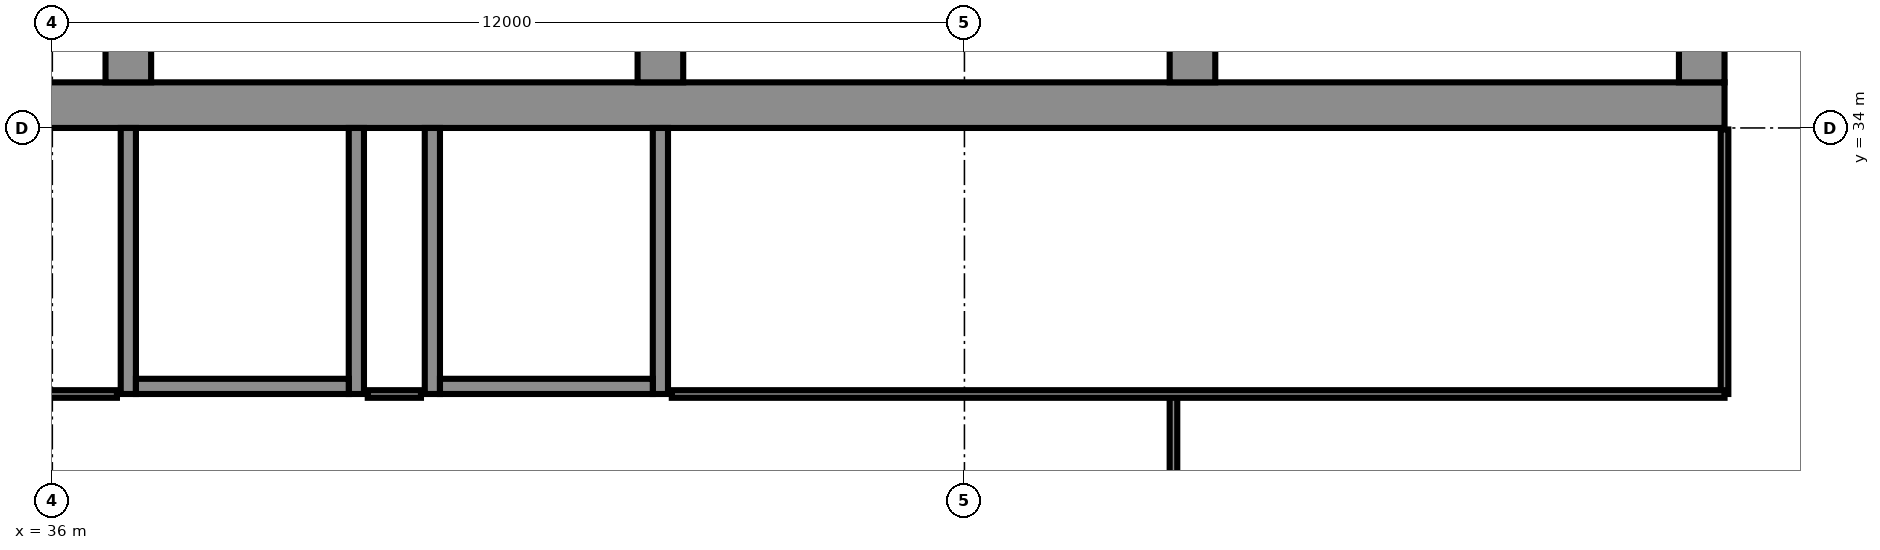
"""IFC4 building model, lengths in metres.
Left out: names, types, materials, properties, quantities, classifications, styles, units other than length and angle.
Written with IfcOpenShell. Run it as: python <this file> out.ifc"""

import sys

from ifc_helpers import new_model, si_unit, direction, frame, frame_2d, origin, place, context, subcontext, project, spatial, polyline, rectangle, outline, extrude, element, fill, save


model = new_model("IFC4")
c1 = context("Model", 3, precision=1e-05, world=origin(), true_north=direction((0.0, 1.0)))
c2 = subcontext(c1, "Body", "Model", "MODEL_VIEW")
j1 = project(units=[si_unit("LENGTHUNIT", "METRE"), si_unit("PLANEANGLEUNIT", "RADIAN")], contexts=[c1])
p1 = place(None, origin())
s1 = spatial("IfcSite", under=j1, at=p1, CompositionType="ELEMENT")
p2 = place(p1, origin())
s2 = spatial("IfcBuilding", under=s1, at=p2, CompositionType="ELEMENT")
p3 = place(p2, frame((0.0, 0.0, 207.1)))
s3 = spatial("IfcBuildingStorey", under=s2, at=p3, CompositionType="ELEMENT", Elevation=207.1)
p4 = place(p3, frame((23.0, 34.3, 0.0), z_axis=(0.0, 0.0, 1.0), x_axis=(1.0, 0.0, 0.0)))
e1 = element("IfcWall", 1, at=p4, inside=s3, PredefinedType="SHEAR", context=c2, shape_type="SweptSolid", body=[
    extrude(rectangle(XDim=35.0, YDim=0.6, at=frame_2d((17.5, 0.0))), origin(), (0.0, 0.0, 1.0), 3.6),
])
p5 = place(p4, frame((0.65, 0.0, 0.0)))
e2 = element("IfcOpeningElement", 2, at=p5, cuts=e1, PredefinedType="OPENING", context=c2, shape_type="SweptSolid", body=[
    extrude(rectangle(XDim=1.2, YDim=2.1, at=frame_2d((0.6, 1.05))), frame((0.0, 0.31, 0.0), z_axis=(0.0, -1.0, 0.0), x_axis=(1.0, 0.0, 0.0)), (0.0, 0.0, 1.0), 0.62),
])
p6 = place(p4, frame((7.717, 0.0, 0.0)))
e3 = element("IfcOpeningElement", 3, at=p6, cuts=e1, PredefinedType="OPENING", context=c2, shape_type="SweptSolid", body=[
    extrude(rectangle(XDim=1.1, YDim=2.1, at=frame_2d((0.55, 1.05))), frame((0.0, 0.31, 0.0), z_axis=(0.0, -1.0, 0.0), x_axis=(1.0, 0.0, 0.0)), (0.0, 0.0, 1.0), 0.62),
])
p7 = place(p4, frame((12.183, 0.0, 0.0)))
e4 = element("IfcOpeningElement", 4, at=p7, cuts=e1, PredefinedType="OPENING", context=c2, shape_type="SweptSolid", body=[
    extrude(rectangle(XDim=1.1, YDim=2.1, at=frame_2d((0.55, 1.05))), frame((0.0, 0.31, 0.0), z_axis=(0.0, -1.0, 0.0), x_axis=(1.0, 0.0, 0.0)), (0.0, 0.0, 1.0), 0.62),
])
p8 = place(p4, frame((9.8, 0.0, 0.0)))
e5 = element("IfcOpeningElement", 5, at=p8, cuts=e1, PredefinedType="OPENING", context=c2, shape_type="SweptSolid", body=[
    extrude(rectangle(XDim=1.4, YDim=2.1, at=frame_2d((0.7, 1.05))), frame((0.0, 0.31, 0.0), z_axis=(0.0, -1.0, 0.0), x_axis=(1.0, 0.0, 0.0)), (0.0, 0.0, 1.0), 0.62),
])
p9 = place(p4, frame((14.717, 0.0, 0.0)))
e6 = element("IfcOpeningElement", 6, at=p9, cuts=e1, PredefinedType="OPENING", context=c2, shape_type="SweptSolid", body=[
    extrude(rectangle(XDim=1.1, YDim=2.1, at=frame_2d((0.55, 1.05))), frame((0.0, 0.31, 0.0), z_axis=(0.0, -1.0, 0.0), x_axis=(1.0, 0.0, 0.0)), (0.0, 0.0, 1.0), 0.62),
])
p10 = place(p4, frame((16.95, 0.0, 0.0)))
e7 = element("IfcOpeningElement", 7, at=p10, cuts=e1, PredefinedType="OPENING", context=c2, shape_type="SweptSolid", body=[
    extrude(rectangle(XDim=1.1, YDim=2.1, at=frame_2d((0.55, 1.05))), frame((0.0, 0.31, 0.0), z_axis=(0.0, -1.0, 0.0), x_axis=(1.0, 0.0, 0.0)), (0.0, 0.0, 1.0), 0.62),
])
p11 = place(p4, frame((19.183, 0.0, 0.0)))
e8 = element("IfcOpeningElement", 8, at=p11, cuts=e1, PredefinedType="OPENING", context=c2, shape_type="SweptSolid", body=[
    extrude(rectangle(XDim=1.1, YDim=2.1, at=frame_2d((0.55, 1.05))), frame((0.0, 0.31, 0.0), z_axis=(0.0, -1.0, 0.0), x_axis=(1.0, 0.0, 0.0)), (0.0, 0.0, 1.0), 0.62),
])
p12 = place(p4, frame((26.15, 0.0, 0.0)))
e9 = element("IfcOpeningElement", 9, at=p12, cuts=e1, PredefinedType="OPENING", context=c2, shape_type="SweptSolid", body=[
    extrude(rectangle(XDim=1.2, YDim=2.1, at=frame_2d((0.6, 1.05))), frame((0.0, 0.31, 0.0), z_axis=(0.0, -1.0, 0.0), x_axis=(1.0, 0.0, 0.0)), (0.0, 0.0, 1.0), 0.62),
])
p13 = place(p4, frame((28.767, 0.0, 0.0)))
e10 = element("IfcOpeningElement", 10, at=p13, cuts=e1, PredefinedType="OPENING", context=c2, shape_type="SweptSolid", body=[
    extrude(rectangle(XDim=1.0, YDim=2.1, at=frame_2d((0.5, 1.05))), frame((0.0, 0.31, 0.0), z_axis=(0.0, -1.0, 0.0), x_axis=(1.0, 0.0, 0.0)), (0.0, 0.0, 1.0), 0.62),
])
p14 = place(p4, frame((33.083, 0.0, 0.0)))
e11 = element("IfcOpeningElement", 11, at=p14, cuts=e1, PredefinedType="OPENING", context=c2, shape_type="SweptSolid", body=[
    extrude(rectangle(XDim=1.0, YDim=2.1, at=frame_2d((0.5, 1.05))), frame((0.0, 0.31, 0.0), z_axis=(0.0, -1.0, 0.0), x_axis=(1.0, 0.0, 0.0)), (0.0, 0.0, 1.0), 0.62),
])
p15 = place(p4, frame((30.8, 0.0, 0.0)))
e12 = element("IfcOpeningElement", 12, at=p15, cuts=e1, PredefinedType="OPENING", context=c2, shape_type="SweptSolid", body=[
    extrude(rectangle(XDim=1.4, YDim=2.1, at=frame_2d((0.7, 1.05))), frame((0.0, 0.31, 0.0), z_axis=(0.0, -1.0, 0.0), x_axis=(1.0, 0.0, 0.0)), (0.0, 0.0, 1.0), 0.62),
])
p16 = place(p3, frame((37.0, 34.6, 0.0), z_axis=(0.0, 0.0, 1.0), x_axis=(0.0, 1.0, 0.0)))
e13 = element("IfcWall", 13, at=p16, inside=s3, PredefinedType="SHEAR", context=c2, shape_type="SweptSolid", body=[
    extrude(rectangle(XDim=14.784, YDim=0.6, at=frame_2d((7.392, 0.0))), origin(), (0.0, 0.0, 1.0), 3.6),
])
p17 = place(p16, frame((11.302, 0.0, 0.0)))
e14 = element("IfcOpeningElement", 14, at=p17, cuts=e13, PredefinedType="OPENING", context=c2, shape_type="SweptSolid", body=[
    extrude(rectangle(XDim=1.0, YDim=2.1, at=frame_2d((0.5, 1.05))), frame((0.0, 0.31, 0.0), z_axis=(0.0, -1.0, 0.0), x_axis=(1.0, 0.0, 0.0)), (0.0, 0.0, 1.0), 0.62),
])
p18 = place(p16, frame((3.8, 0.0, 0.0)))
e15 = element("IfcOpeningElement", 15, at=p18, cuts=e13, PredefinedType="OPENING", context=c2, shape_type="SweptSolid", body=[
    extrude(rectangle(XDim=1.1, YDim=2.1, at=frame_2d((0.55, 1.05))), frame((0.0, 0.31, 0.0), z_axis=(0.0, -1.0, 0.0), x_axis=(1.0, 0.0, 0.0)), (0.0, 0.0, 1.0), 0.62),
])
p19 = place(p3, frame((44.0, 34.6, 0.0), z_axis=(0.0, 0.0, 1.0), x_axis=(0.0, 1.0, 0.0)))
e16 = element("IfcWall", 16, at=p19, inside=s3, PredefinedType="SHEAR", context=c2, shape_type="SweptSolid", body=[
    extrude(rectangle(XDim=14.784, YDim=0.6, at=frame_2d((7.392, 0.0))), origin(), (0.0, 0.0, 1.0), 3.6),
])
p20 = place(p19, frame((11.608, 0.0, 0.0)))
e17 = element("IfcOpeningElement", 17, at=p20, cuts=e16, PredefinedType="OPENING", context=c2, shape_type="SweptSolid", body=[
    extrude(rectangle(XDim=1.0, YDim=2.1, at=frame_2d((0.5, 1.05))), frame((0.0, 0.31, 0.0), z_axis=(0.0, -1.0, 0.0), x_axis=(1.0, 0.0, 0.0)), (0.0, 0.0, 1.0), 0.62),
])
p21 = place(p19, frame((3.8, 0.0, 0.0)))
e18 = element("IfcOpeningElement", 18, at=p21, cuts=e16, PredefinedType="OPENING", context=c2, shape_type="SweptSolid", body=[
    extrude(rectangle(XDim=1.1, YDim=2.1, at=frame_2d((0.55, 1.05))), frame((0.0, 0.31, 0.0), z_axis=(0.0, -1.0, 0.0), x_axis=(1.0, 0.0, 0.0)), (0.0, 0.0, 1.0), 0.62),
])
p22 = place(p3, frame((51.0, 34.6, 0.0), z_axis=(0.0, 0.0, 1.0), x_axis=(0.0, 1.0, 0.0)))
e19 = element("IfcWall", 19, at=p22, inside=s3, PredefinedType="SHEAR", context=c2, shape_type="SweptSolid", body=[
    extrude(rectangle(XDim=14.171, YDim=0.6, at=frame_2d((7.085, 0.0))), origin(), (0.0, 0.0, 1.0), 3.6),
])
p23 = place(p22, frame((3.8, 0.0, 0.0)))
e20 = element("IfcOpeningElement", 20, at=p23, cuts=e19, PredefinedType="OPENING", context=c2, shape_type="SweptSolid", body=[
    extrude(rectangle(XDim=1.1, YDim=2.1, at=frame_2d((0.55, 1.05))), frame((0.0, 0.31, 0.0), z_axis=(0.0, -1.0, 0.0), x_axis=(1.0, 0.0, 0.0)), (0.0, 0.0, 1.0), 0.62),
])
p24 = place(p3, frame((57.7, 34.6, 0.0), z_axis=(0.0, 0.0, 1.0), x_axis=(0.0, 1.0, 0.0)))
e21 = element("IfcWall", 21, at=p24, inside=s3, PredefinedType="SHEAR", context=c2, shape_type="SweptSolid", body=[
    extrude(rectangle(XDim=13.585, YDim=0.6, at=frame_2d((6.792, 0.0))), origin(), (0.0, 0.0, 1.0), 3.6),
])
p25 = place(p3, frame((0.0, 0.0, -0.0)))
e22 = element("IfcWall", 22, at=p25, inside=s3, PredefinedType="PARTITIONING", context=c2, shape_type="SweptSolid", body=[
    extrude(outline(polyline([(34.567, 37.65), (34.767, 37.65), (36.7, 37.65), (36.7, 37.45), (34.767, 37.45), (34.767, 34.6), (34.567, 34.6), (34.567, 37.65)])), origin(), (0.0, 0.0, 1.0), 3.2),
])
p26 = place(p3, frame((0.0, 0.0, -0.0)))
e23 = element("IfcWall", 23, at=p26, inside=s3, PredefinedType="PARTITIONING", context=c2, shape_type="SweptSolid", body=[
    extrude(outline(polyline([(41.567, 37.1), (39.433, 37.1), (39.433, 34.6), (39.233, 34.6), (39.233, 37.45), (37.3, 37.45), (37.3, 37.65), (39.233, 37.65), (39.433, 37.65), (39.433, 37.3), (41.567, 37.3), (41.567, 37.35), (41.767, 37.35), (43.7, 37.35), (43.7, 37.15), (41.767, 37.15), (41.767, 34.6), (41.567, 34.6), (41.567, 37.1)])), origin(), (0.0, 0.0, 1.0), 3.2),
])
p27 = place(p3, frame((0.0, 0.0, -0.0)))
e24 = element("IfcWall", 24, at=p27, inside=s3, PredefinedType="PARTITIONING", context=c2, shape_type="SweptSolid", body=[
    extrude(outline(polyline([(53.233, 34.6), (53.233, 37.3), (53.433, 37.3), (53.433, 34.6), (53.233, 34.6)])), origin(), (0.0, 0.0, 1.0), 3.2),
])
p28 = place(p3, frame((0.0, 0.0, -0.0)))
e25 = element("IfcWall", 25, at=p28, inside=s3, PredefinedType="PARTITIONING", context=c2, shape_type="SweptSolid", body=[
    extrude(outline(polyline([(55.567, 34.6), (55.567, 37.3), (55.767, 37.3), (55.767, 34.6), (55.567, 34.6)])), origin(), (0.0, 0.0, 1.0), 3.2),
])
p29 = place(p3, frame((37.0, 30.5, 0.0), z_axis=(0.0, 0.0, 1.0), x_axis=(0.0, 1.0, 0.0)))
e26 = element("IfcWall", 26, at=p29, inside=s3, PredefinedType="PARTITIONING", context=c2, shape_type="SweptSolid", body=[
    extrude(rectangle(XDim=3.5, YDim=0.2, at=frame_2d((1.75, 0.0))), origin(), (0.0, 0.0, 1.0), 3.2),
])
p30 = place(p29, frame((1.2, 0.0, 0.0)))
e27 = element("IfcOpeningElement", 27, at=p30, cuts=e26, PredefinedType="OPENING", context=c2, shape_type="SweptSolid", body=[
    extrude(rectangle(XDim=1.1, YDim=2.1, at=frame_2d((0.55, 1.05))), frame((0.0, 0.11, 0.0), z_axis=(0.0, -1.0, 0.0), x_axis=(1.0, 0.0, 0.0)), (0.0, 0.0, 1.0), 0.22),
])
p31 = place(p3, frame((40.0, 30.5, 0.0), z_axis=(0.0, 0.0, 1.0), x_axis=(0.0, 1.0, 0.0)))
e28 = element("IfcWall", 28, at=p31, inside=s3, PredefinedType="PARTITIONING", context=c2, shape_type="SweptSolid", body=[
    extrude(rectangle(XDim=3.5, YDim=0.2, at=frame_2d((1.75, 0.0))), origin(), (0.0, 0.0, 1.0), 3.2),
])
p32 = place(p3, frame((37.1, 30.6, 0.0), z_axis=(0.0, 0.0, 1.0), x_axis=(1.0, 0.0, 0.0)))
e29 = element("IfcWall", 29, at=p32, inside=s3, PredefinedType="PARTITIONING", context=c2, shape_type="SweptSolid", body=[
    extrude(rectangle(XDim=2.8, YDim=0.2, at=frame_2d((1.4, 0.0))), origin(), (0.0, 0.0, 1.0), 3.2),
])
p33 = place(p3, frame((41.0, 30.5, 0.0), z_axis=(0.0, 0.0, 1.0), x_axis=(0.0, 1.0, 0.0)))
e30 = element("IfcWall", 30, at=p33, inside=s3, PredefinedType="PARTITIONING", context=c2, shape_type="SweptSolid", body=[
    extrude(rectangle(XDim=3.5, YDim=0.2, at=frame_2d((1.75, 0.0))), origin(), (0.0, 0.0, 1.0), 3.2),
])
p34 = place(p3, frame((44.0, 30.5, 0.0), z_axis=(0.0, 0.0, 1.0), x_axis=(0.0, 1.0, 0.0)))
e31 = element("IfcWall", 31, at=p34, inside=s3, PredefinedType="PARTITIONING", context=c2, shape_type="SweptSolid", body=[
    extrude(rectangle(XDim=3.5, YDim=0.2, at=frame_2d((1.75, 0.0))), origin(), (0.0, 0.0, 1.0), 3.2),
])
p35 = place(p34, frame((1.2, 0.0, 0.0)))
e32 = element("IfcOpeningElement", 32, at=p35, cuts=e31, PredefinedType="OPENING", context=c2, shape_type="SweptSolid", body=[
    extrude(rectangle(XDim=1.1, YDim=2.1, at=frame_2d((0.55, 1.05))), frame((0.0, 0.11, 0.0), z_axis=(0.0, -1.0, 0.0), x_axis=(1.0, 0.0, 0.0)), (0.0, 0.0, 1.0), 0.22),
])
p36 = place(p3, frame((41.1, 30.6, 0.0), z_axis=(0.0, 0.0, 1.0), x_axis=(1.0, 0.0, 0.0)))
e33 = element("IfcWall", 33, at=p36, inside=s3, PredefinedType="PARTITIONING", context=c2, shape_type="SweptSolid", body=[
    extrude(rectangle(XDim=2.8, YDim=0.2, at=frame_2d((1.4, 0.0))), origin(), (0.0, 0.0, 1.0), 3.2),
])
p37 = place(p3, frame((29.4, 30.5, 0.0), z_axis=(0.0, 0.0, 1.0), x_axis=(1.0, 0.0, 0.0)))
e34 = element("IfcWall", 34, at=p37, inside=s3, PredefinedType="PARTITIONING", context=c2, shape_type="SweptSolid", body=[
    extrude(rectangle(XDim=7.45, YDim=0.1, at=frame_2d((3.725, 0.0))), origin(), (0.0, 0.0, 1.0), 3.2),
])
p38 = place(p3, frame((50.75, 19.2, 0.0), z_axis=(0.0, 0.0, 1.0), x_axis=(0.0, 1.0, 0.0)))
e35 = element("IfcWall", 35, at=p38, inside=s3, PredefinedType="PARTITIONING", context=c2, shape_type="SweptSolid", body=[
    extrude(rectangle(XDim=11.3, YDim=0.1, at=frame_2d((5.65, 0.0))), origin(), (0.0, 0.0, 1.0), 3.2),
])
p39 = place(p3, frame((58.0, 30.5, 0.0), z_axis=(0.0, 0.0, 1.0), x_axis=(0.0, 1.0, 0.0)))
e36 = element("IfcWall", 36, at=p39, inside=s3, PredefinedType="PARTITIONING", context=c2, shape_type="SweptSolid", body=[
    extrude(rectangle(XDim=3.48, YDim=0.1, at=frame_2d((1.74, 0.0))), origin(), (0.0, 0.0, 1.0), 3.2),
])
p40 = place(p3, frame((40.15, 30.5, 0.0), z_axis=(0.0, 0.0, 1.0), x_axis=(1.0, 0.0, 0.0)))
e37 = element("IfcWall", 37, at=p40, inside=s3, PredefinedType="PARTITIONING", context=c2, shape_type="SweptSolid", body=[
    extrude(rectangle(XDim=0.7, YDim=0.1, at=frame_2d((0.35, 0.0))), origin(), (0.0, 0.0, 1.0), 3.2),
])
p41 = place(p3, frame((44.15, 30.5, 0.0), z_axis=(0.0, 0.0, 1.0), x_axis=(1.0, 0.0, 0.0)))
e38 = element("IfcWall", 38, at=p41, inside=s3, PredefinedType="PARTITIONING", context=c2, shape_type="SweptSolid", body=[
    extrude(rectangle(XDim=13.85, YDim=0.1, at=frame_2d((6.925, 0.0))), origin(), (0.0, 0.0, 1.0), 3.2),
])
p42 = place(p41, frame((2.77, 0.0, 0.0)))
e39 = element("IfcOpeningElement", 39, at=p42, cuts=e38, PredefinedType="OPENING", context=c2, shape_type="SweptSolid", body=[
    extrude(rectangle(XDim=1.0, YDim=2.1, at=frame_2d((0.5, 1.05))), frame((0.0, 0.06, 0.0), z_axis=(0.0, -1.0, 0.0), x_axis=(1.0, 0.0, 0.0)), (0.0, 0.0, 1.0), 0.12),
])
p43 = place(p7, origin())
e40 = element("IfcDoor", 40, at=p43, inside=s3, OperationType="DOUBLE_DOOR_SLIDING", PredefinedType="DOOR", context=c2, shape_type="SweptSolid", body=[
    extrude(rectangle(XDim=1.1, YDim=2.1, at=frame_2d((0.55, 1.05))), frame((0.0, 0.025, 0.0), z_axis=(0.0, -1.0, 0.0), x_axis=(1.0, 0.0, 0.0)), (0.0, 0.0, 1.0), 0.05),
])
fill(e4, e40)
p44 = place(p9, origin())
e41 = element("IfcDoor", 41, at=p44, inside=s3, OperationType="DOUBLE_DOOR_SLIDING", PredefinedType="DOOR", context=c2, shape_type="SweptSolid", body=[
    extrude(rectangle(XDim=1.1, YDim=2.1, at=frame_2d((0.55, 1.05))), frame((0.0, 0.025, 0.0), z_axis=(0.0, -1.0, 0.0), x_axis=(1.0, 0.0, 0.0)), (0.0, 0.0, 1.0), 0.05),
])
fill(e6, e41)
p45 = place(p10, origin())
e42 = element("IfcDoor", 42, at=p45, inside=s3, OperationType="DOUBLE_DOOR_SLIDING", PredefinedType="DOOR", context=c2, shape_type="SweptSolid", body=[
    extrude(rectangle(XDim=1.1, YDim=2.1, at=frame_2d((0.55, 1.05))), frame((0.0, 0.025, 0.0), z_axis=(0.0, -1.0, 0.0), x_axis=(1.0, 0.0, 0.0)), (0.0, 0.0, 1.0), 0.05),
])
fill(e7, e42)
p46 = place(p11, origin())
e43 = element("IfcDoor", 43, at=p46, inside=s3, OperationType="DOUBLE_DOOR_SLIDING", PredefinedType="DOOR", context=c2, shape_type="SweptSolid", body=[
    extrude(rectangle(XDim=1.1, YDim=2.1, at=frame_2d((0.55, 1.05))), frame((0.0, 0.025, 0.0), z_axis=(0.0, -1.0, 0.0), x_axis=(1.0, 0.0, 0.0)), (0.0, 0.0, 1.0), 0.05),
])
fill(e8, e43)
p47 = place(p12, origin())
e44 = element("IfcDoor", 44, at=p47, inside=s3, OperationType="SINGLE_SWING_LEFT", PredefinedType="DOOR", context=c2, shape_type="SweptSolid", body=[
    extrude(rectangle(XDim=1.2, YDim=2.1, at=frame_2d((0.6, 1.05))), frame((0.0, 0.025, 0.0), z_axis=(0.0, -1.0, 0.0), x_axis=(1.0, 0.0, 0.0)), (0.0, 0.0, 1.0), 0.05),
])
fill(e9, e44)
p48 = place(p13, origin())
e45 = element("IfcDoor", 45, at=p48, inside=s3, OperationType="SINGLE_SWING_LEFT", PredefinedType="DOOR", context=c2, shape_type="SweptSolid", body=[
    extrude(rectangle(XDim=1.0, YDim=2.1, at=frame_2d((0.5, 1.05))), frame((0.0, 0.025, 0.0), z_axis=(0.0, -1.0, 0.0), x_axis=(1.0, 0.0, 0.0)), (0.0, 0.0, 1.0), 0.05),
])
fill(e10, e45)
p49 = place(p14, origin())
e46 = element("IfcDoor", 46, at=p49, inside=s3, OperationType="SINGLE_SWING_LEFT", PredefinedType="DOOR", context=c2, shape_type="SweptSolid", body=[
    extrude(rectangle(XDim=1.0, YDim=2.1, at=frame_2d((0.5, 1.05))), frame((0.0, 0.025, 0.0), z_axis=(0.0, -1.0, 0.0), x_axis=(1.0, 0.0, 0.0)), (0.0, 0.0, 1.0), 0.05),
])
fill(e11, e46)
p50 = place(p15, origin())
e47 = element("IfcDoor", 47, at=p50, inside=s3, OperationType="DOUBLE_DOOR_SINGLE_SWING", PredefinedType="DOOR", context=c2, shape_type="SweptSolid", body=[
    extrude(rectangle(XDim=1.4, YDim=2.1, at=frame_2d((0.7, 1.05))), frame((0.0, 0.025, 0.0), z_axis=(0.0, -1.0, 0.0), x_axis=(1.0, 0.0, 0.0)), (0.0, 0.0, 1.0), 0.05),
])
fill(e12, e47)
p51 = place(p30, origin())
e48 = element("IfcDoor", 48, at=p51, inside=s3, OperationType="SINGLE_SWING_LEFT", PredefinedType="DOOR", context=c2, shape_type="SweptSolid", body=[
    extrude(rectangle(XDim=1.1, YDim=2.1, at=frame_2d((0.55, 1.05))), frame((0.0, 0.025, 0.0), z_axis=(0.0, -1.0, 0.0), x_axis=(1.0, 0.0, 0.0)), (0.0, 0.0, 1.0), 0.05),
])
fill(e27, e48)
p52 = place(p35, origin())
e49 = element("IfcDoor", 49, at=p52, inside=s3, OperationType="SINGLE_SWING_LEFT", PredefinedType="DOOR", context=c2, shape_type="SweptSolid", body=[
    extrude(rectangle(XDim=1.1, YDim=2.1, at=frame_2d((0.55, 1.05))), frame((0.0, 0.025, 0.0), z_axis=(0.0, -1.0, 0.0), x_axis=(1.0, 0.0, 0.0)), (0.0, 0.0, 1.0), 0.05),
])
fill(e32, e49)
p53 = place(p42, origin())
e50 = element("IfcDoor", 50, at=p53, inside=s3, OperationType="SINGLE_SWING_RIGHT", PredefinedType="DOOR", context=c2, shape_type="SweptSolid", body=[
    extrude(rectangle(XDim=1.0, YDim=2.1, at=frame_2d((0.5, 1.05))), frame((0.0, 0.025, 0.0), z_axis=(0.0, -1.0, 0.0), x_axis=(1.0, 0.0, 0.0)), (0.0, 0.0, 1.0), 0.05),
])
fill(e39, e50)
save(model, sys.argv[1])
